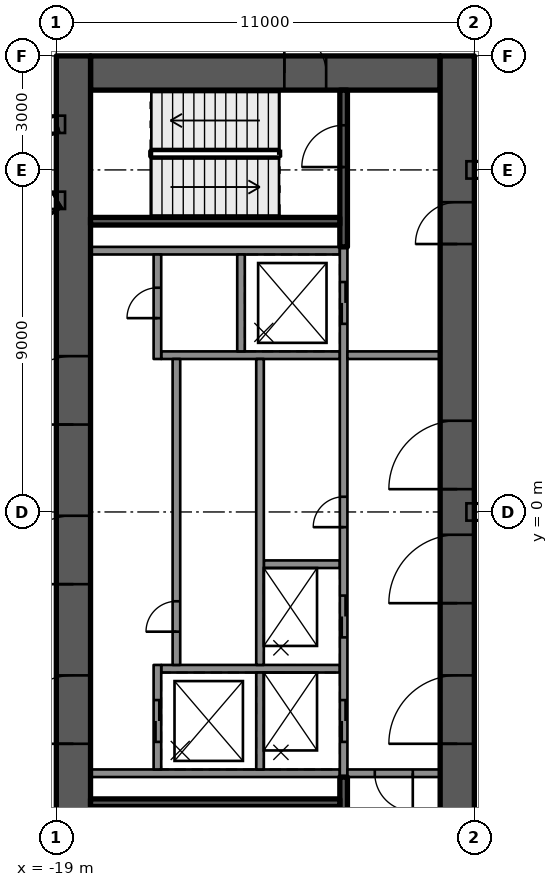
"""IFC4 building model, lengths in metres.
Left out: names, types, materials, properties, quantities, classifications, styles, units other than length and angle.
Written with IfcOpenShell. Run it as: python <this file> out.ifc"""

import sys

from ifc_helpers import new_model, si_unit, direction, frame, frame_2d, origin, place, context, subcontext, project, spatial, rectangle, extrude, element, fill, save


model = new_model("IFC4")
c1 = context("Model", 3, precision=1e-05, world=origin(), true_north=direction((0.0, 1.0)))
c2 = subcontext(c1, "Body", "Model", "MODEL_VIEW")
j1 = project(units=[si_unit("LENGTHUNIT", "METRE"), si_unit("PLANEANGLEUNIT", "RADIAN")], contexts=[c1])
p1 = place(None, origin())
s1 = spatial("IfcSite", under=j1, at=p1, CompositionType="ELEMENT")
p2 = place(p1, origin())
s2 = spatial("IfcBuilding", under=s1, at=p2, CompositionType="ELEMENT")
p3 = place(p2, frame((0.0, 0.0, 271.0)))
s3 = spatial("IfcBuildingStorey", under=s2, at=p3, CompositionType="ELEMENT", Elevation=271.0)
p4 = place(p3, frame((-18.1, 11.55, 0.0), z_axis=(0.0, 0.0, 1.0), x_axis=(1.0, 0.0, 0.0)))
e1 = element("IfcWall", 1, at=p4, inside=s3, PredefinedType="SHEAR", context=c2, shape_type="SweptSolid", body=[
    extrude(rectangle(XDim=9.2, YDim=0.9, at=frame_2d((4.6, 0.0))), origin(), (0.0, 0.0, 1.0), 4.4),
])
p5 = place(p4, frame((5.1, 0.0, 0.0)))
e2 = element("IfcOpeningElement", 2, at=p5, cuts=e1, PredefinedType="OPENING", context=c2, shape_type="SweptSolid", body=[
    extrude(rectangle(XDim=1.1, YDim=2.1, at=frame_2d((0.55, 1.05))), frame((0.0, 0.46, 0.0), z_axis=(0.0, -1.0, 0.0), x_axis=(1.0, 0.0, 0.0)), (0.0, 0.0, 1.0), 0.92),
])
p6 = place(p3, frame((-18.55, -12.0, 0.0), z_axis=(0.0, 0.0, 1.0), x_axis=(0.0, 1.0, 0.0)))
e3 = element("IfcWall", 3, at=p6, inside=s3, PredefinedType="SHEAR", context=c2, shape_type="SweptSolid", body=[
    extrude(rectangle(XDim=24.0, YDim=0.9, at=frame_2d((12.0, 0.0))), origin(), (0.0, 0.0, 1.0), 4.4),
])
p7 = place(p6, frame((5.9, 0.0, 0.0)))
e4 = element("IfcOpeningElement", 4, at=p7, cuts=e3, PredefinedType="OPENING", context=c2, shape_type="SweptSolid", body=[
    extrude(rectangle(XDim=1.8, YDim=2.1, at=frame_2d((0.9, 1.05))), frame((0.0, 0.46, 0.0), z_axis=(0.0, -1.0, 0.0), x_axis=(1.0, 0.0, 0.0)), (0.0, 0.0, 1.0), 0.92),
])
p8 = place(p6, frame((10.1, 0.0, 0.0)))
e5 = element("IfcOpeningElement", 5, at=p8, cuts=e3, PredefinedType="OPENING", context=c2, shape_type="SweptSolid", body=[
    extrude(rectangle(XDim=1.8, YDim=2.1, at=frame_2d((0.9, 1.05))), frame((0.0, 0.46, 0.0), z_axis=(0.0, -1.0, 0.0), x_axis=(1.0, 0.0, 0.0)), (0.0, 0.0, 1.0), 0.92),
])
p9 = place(p6, frame((14.3, 0.0, 0.0)))
e6 = element("IfcOpeningElement", 6, at=p9, cuts=e3, PredefinedType="OPENING", context=c2, shape_type="SweptSolid", body=[
    extrude(rectangle(XDim=1.8, YDim=2.1, at=frame_2d((0.9, 1.05))), frame((0.0, 0.46, 0.0), z_axis=(0.0, -1.0, 0.0), x_axis=(1.0, 0.0, 0.0)), (0.0, 0.0, 1.0), 0.92),
])
p10 = place(p3, frame((-8.45, -12.0, 0.0), z_axis=(0.0, 0.0, 1.0), x_axis=(0.0, 1.0, 0.0)))
e7 = element("IfcWall", 7, at=p10, inside=s3, PredefinedType="SHEAR", context=c2, shape_type="SweptSolid", body=[
    extrude(rectangle(XDim=24.0, YDim=0.9, at=frame_2d((12.0, 0.0))), origin(), (0.0, 0.0, 1.0), 4.4),
])
p11 = place(p10, frame((9.6, 0.0, 0.0)))
e8 = element("IfcOpeningElement", 8, at=p11, cuts=e7, PredefinedType="OPENING", context=c2, shape_type="SweptSolid", body=[
    extrude(rectangle(XDim=1.8, YDim=2.1, at=frame_2d((0.9, 1.05))), frame((0.0, 0.46, 0.0), z_axis=(0.0, -1.0, 0.0), x_axis=(1.0, 0.0, 0.0)), (0.0, 0.0, 1.0), 0.92),
])
p12 = place(p10, frame((5.9, 0.0, 0.0)))
e9 = element("IfcOpeningElement", 9, at=p12, cuts=e7, PredefinedType="OPENING", context=c2, shape_type="SweptSolid", body=[
    extrude(rectangle(XDim=1.8, YDim=2.1, at=frame_2d((0.9, 1.05))), frame((0.0, 0.46, 0.0), z_axis=(0.0, -1.0, 0.0), x_axis=(1.0, 0.0, 0.0)), (0.0, 0.0, 1.0), 0.92),
])
p13 = place(p10, frame((12.6, 0.0, 0.0)))
e10 = element("IfcOpeningElement", 10, at=p13, cuts=e7, PredefinedType="OPENING", context=c2, shape_type="SweptSolid", body=[
    extrude(rectangle(XDim=1.8, YDim=2.1, at=frame_2d((0.9, 1.05))), frame((0.0, 0.46, 0.0), z_axis=(0.0, -1.0, 0.0), x_axis=(1.0, 0.0, 0.0)), (0.0, 0.0, 1.0), 0.92),
])
p14 = place(p10, frame((19.05, 0.0, 0.0)))
e11 = element("IfcOpeningElement", 11, at=p14, cuts=e7, PredefinedType="OPENING", context=c2, shape_type="SweptSolid", body=[
    extrude(rectangle(XDim=1.1, YDim=2.1, at=frame_2d((0.55, 1.05))), frame((0.0, 0.46, 0.0), z_axis=(0.0, -1.0, 0.0), x_axis=(1.0, 0.0, 0.0)), (0.0, 0.0, 1.0), 0.92),
])
for number, where, z_axis, x_axis in (
    (12, (-11.54, 6.875, 0.0), (0.0, 0.0, 1.0), (-1.0, 0.0, 0.0)),
    (13, (-11.54, -6.875, 0.0), (0.0, 0.0, 1.0), (-1.0, 0.0, 0.0)),
):
    element("IfcWall", number, at=place(p3, frame(where, z_axis=z_axis, x_axis=x_axis)), inside=s3, PredefinedType="SOLIDWALL", context=c2, shape_type="SweptSolid", body=[
        extrude(rectangle(XDim=6.56, YDim=0.2, at=frame_2d((3.28, 0.0))), origin(), (0.0, 0.0, 1.0), 3.99),
    ])
p15 = place(p3, frame((-11.54, -4.125, 0.0), z_axis=(0.0, 0.0, 1.0), x_axis=(-1.0, 0.0, 0.0)))
e14 = element("IfcWall", 14, at=p15, inside=s3, PredefinedType="SOLIDWALL", context=c2, shape_type="SweptSolid", body=[
    extrude(rectangle(XDim=4.7, YDim=0.2, at=frame_2d((2.35, 0.0))), origin(), (0.0, 0.0, 1.0), 3.99),
])
p16 = place(p3, frame((-11.54, -1.375, 0.0), z_axis=(0.0, 0.0, 1.0), x_axis=(-1.0, 0.0, 0.0)))
e15 = element("IfcWall", 15, at=p16, inside=s3, PredefinedType="SOLIDWALL", context=c2, shape_type="SweptSolid", body=[
    extrude(rectangle(XDim=2.0, YDim=0.2, at=frame_2d((1.0, 0.0))), origin(), (0.0, 0.0, 1.0), 3.99),
])
p17 = place(p3, frame((-11.54, 4.125, 0.0), z_axis=(0.0, 0.0, 1.0), x_axis=(-1.0, 0.0, 0.0)))
e16 = element("IfcWall", 16, at=p17, inside=s3, PredefinedType="SOLIDWALL", context=c2, shape_type="SweptSolid", body=[
    extrude(rectangle(XDim=4.7, YDim=0.2, at=frame_2d((2.35, 0.0))), origin(), (0.0, 0.0, 1.0), 3.99),
])
p18 = place(p3, frame((-11.44, -6.975, 0.0), z_axis=(0.0, 0.0, 1.0), x_axis=(0.0, 1.0, 0.0)))
e17 = element("IfcWall", 17, at=p18, inside=s3, PredefinedType="SOLIDWALL", context=c2, shape_type="SweptSolid", body=[
    extrude(rectangle(XDim=13.95, YDim=0.2, at=frame_2d((6.975, 0.0))), origin(), (0.0, 0.0, 1.0), 3.99),
])
p19 = place(p18, frame((0.925, 0.0, 0.0)))
e18 = element("IfcOpeningElement", 18, at=p19, cuts=e17, PredefinedType="OPENING", context=c2, shape_type="SweptSolid", body=[
    extrude(rectangle(XDim=1.1, YDim=2.1, at=frame_2d((0.55, 1.05))), frame((0.0, 0.11, 0.0), z_axis=(0.0, -1.0, 0.0), x_axis=(1.0, 0.0, 0.0)), (0.0, 0.0, 1.0), 0.22),
])
p20 = place(p18, frame((3.675, 0.0, 0.0)))
e19 = element("IfcOpeningElement", 19, at=p20, cuts=e17, PredefinedType="OPENING", context=c2, shape_type="SweptSolid", body=[
    extrude(rectangle(XDim=1.1, YDim=2.1, at=frame_2d((0.55, 1.05))), frame((0.0, 0.11, 0.0), z_axis=(0.0, -1.0, 0.0), x_axis=(1.0, 0.0, 0.0)), (0.0, 0.0, 1.0), 0.22),
])
p21 = place(p18, frame((11.925, 0.0, 0.0)))
e20 = element("IfcOpeningElement", 20, at=p21, cuts=e17, PredefinedType="OPENING", context=c2, shape_type="SweptSolid", body=[
    extrude(rectangle(XDim=1.1, YDim=2.1, at=frame_2d((0.55, 1.05))), frame((0.0, 0.11, 0.0), z_axis=(0.0, -1.0, 0.0), x_axis=(1.0, 0.0, 0.0)), (0.0, 0.0, 1.0), 0.22),
])
p22 = place(p18, frame((6.575, 0.0, 0.0)))
e21 = element("IfcOpeningElement", 21, at=p22, cuts=e17, PredefinedType="OPENING", context=c2, shape_type="SweptSolid", body=[
    extrude(rectangle(XDim=0.8, YDim=2.1, at=frame_2d((0.4, 1.05))), frame((0.0, 0.11, 0.0), z_axis=(0.0, -1.0, 0.0), x_axis=(1.0, 0.0, 0.0)), (0.0, 0.0, 1.0), 0.22),
])
p23 = place(p3, frame((-13.64, -6.775, 0.0), z_axis=(0.0, 0.0, 1.0), x_axis=(0.0, 1.0, 0.0)))
e22 = element("IfcWall", 22, at=p23, inside=s3, PredefinedType="SOLIDWALL", context=c2, shape_type="SweptSolid", body=[
    extrude(rectangle(XDim=2.55, YDim=0.2, at=frame_2d((1.275, 0.0))), origin(), (0.0, 0.0, 1.0), 3.99),
])
p24 = place(p3, frame((-13.64, -4.025, 0.0), z_axis=(0.0, 0.0, 1.0), x_axis=(0.0, 1.0, 0.0)))
e23 = element("IfcWall", 23, at=p24, inside=s3, PredefinedType="SOLIDWALL", context=c2, shape_type="SweptSolid", body=[
    extrude(rectangle(XDim=8.05, YDim=0.2, at=frame_2d((4.025, 0.0))), origin(), (0.0, 0.0, 1.0), 3.99),
])
p25 = place(p3, frame((-14.14, 4.225, 0.0), z_axis=(0.0, 0.0, 1.0), x_axis=(0.0, 1.0, 0.0)))
e24 = element("IfcWall", 24, at=p25, inside=s3, PredefinedType="SOLIDWALL", context=c2, shape_type="SweptSolid", body=[
    extrude(rectangle(XDim=2.55, YDim=0.2, at=frame_2d((1.275, 0.0))), origin(), (0.0, 0.0, 1.0), 3.99),
])
p26 = place(p3, frame((-16.34, -6.775, 0.0), z_axis=(0.0, 0.0, 1.0), x_axis=(0.0, 1.0, 0.0)))
e25 = element("IfcWall", 25, at=p26, inside=s3, PredefinedType="SOLIDWALL", context=c2, shape_type="SweptSolid", body=[
    extrude(rectangle(XDim=2.75, YDim=0.2, at=frame_2d((1.375, 0.0))), origin(), (0.0, 0.0, 1.0), 3.99),
])
p27 = place(p26, frame((0.725, 0.0, 0.0)))
e26 = element("IfcOpeningElement", 26, at=p27, cuts=e25, PredefinedType="OPENING", context=c2, shape_type="SweptSolid", body=[
    extrude(rectangle(XDim=1.1, YDim=2.1, at=frame_2d((0.55, 1.05))), frame((0.0, 0.11, 0.0), z_axis=(0.0, -1.0, 0.0), x_axis=(1.0, 0.0, 0.0)), (0.0, 0.0, 1.0), 0.22),
])
p28 = place(p3, frame((-15.84, -4.025, 0.0), z_axis=(0.0, 0.0, 1.0), x_axis=(0.0, 1.0, 0.0)))
e27 = element("IfcWall", 27, at=p28, inside=s3, PredefinedType="SOLIDWALL", context=c2, shape_type="SweptSolid", body=[
    extrude(rectangle(XDim=8.05, YDim=0.2, at=frame_2d((4.025, 0.0))), origin(), (0.0, 0.0, 1.0), 3.99),
])
p29 = place(p28, frame((0.875, 0.0, 0.0)))
e28 = element("IfcOpeningElement", 28, at=p29, cuts=e27, PredefinedType="OPENING", context=c2, shape_type="SweptSolid", body=[
    extrude(rectangle(XDim=0.8, YDim=2.1, at=frame_2d((0.4, 1.05))), frame((0.0, 0.11, 0.0), z_axis=(0.0, -1.0, 0.0), x_axis=(1.0, 0.0, 0.0)), (0.0, 0.0, 1.0), 0.22),
])
p30 = place(p3, frame((-16.34, 4.025, 0.0), z_axis=(0.0, 0.0, 1.0), x_axis=(0.0, 1.0, 0.0)))
e29 = element("IfcWall", 29, at=p30, inside=s3, PredefinedType="SOLIDWALL", context=c2, shape_type="SweptSolid", body=[
    extrude(rectangle(XDim=2.75, YDim=0.2, at=frame_2d((1.375, 0.0))), origin(), (0.0, 0.0, 1.0), 3.99),
])
p31 = place(p30, frame((1.075, 0.0, 0.0)))
e30 = element("IfcOpeningElement", 30, at=p31, cuts=e29, PredefinedType="OPENING", context=c2, shape_type="SweptSolid", body=[
    extrude(rectangle(XDim=0.8, YDim=2.1, at=frame_2d((0.4, 1.05))), frame((0.0, 0.11, 0.0), z_axis=(0.0, -1.0, 0.0), x_axis=(1.0, 0.0, 0.0)), (0.0, 0.0, 1.0), 0.22),
])
p32 = place(p3, frame((-11.44, 6.975, 0.0), z_axis=(0.0, 0.0, 1.0), x_axis=(0.0, 1.0, 0.0)))
e31 = element("IfcWall", 31, at=p32, inside=s3, PredefinedType="SOLIDWALL", context=c2, shape_type="SweptSolid", body=[
    extrude(rectangle(XDim=4.125, YDim=0.2, at=frame_2d((2.062, 0.0))), origin(), (0.0, 0.0, 1.0), 3.99),
])
p33 = place(p32, frame((2.1, 0.0, 0.0)))
e32 = element("IfcOpeningElement", 32, at=p33, cuts=e31, PredefinedType="OPENING", context=c2, shape_type="SweptSolid", body=[
    extrude(rectangle(XDim=1.1, YDim=2.1, at=frame_2d((0.55, 1.05))), frame((0.0, 0.11, 0.0), z_axis=(0.0, -1.0, 0.0), x_axis=(1.0, 0.0, 0.0)), (0.0, 0.0, 1.0), 0.22),
])
p34 = place(p3, frame((-11.54, 7.65, 0.0), z_axis=(0.0, 0.0, 1.0), x_axis=(-1.0, 0.0, 0.0)))
e33 = element("IfcWall", 33, at=p34, inside=s3, PredefinedType="SOLIDWALL", context=c2, shape_type="SweptSolid", body=[
    extrude(rectangle(XDim=6.56, YDim=0.2, at=frame_2d((3.28, 0.0))), origin(), (0.0, 0.0, 1.0), 3.99),
])
p35 = place(p3, frame((-11.44, -11.1, 0.0), z_axis=(0.0, 0.0, 1.0), x_axis=(0.0, 1.0, 0.0)))
e34 = element("IfcWall", 34, at=p35, inside=s3, PredefinedType="SOLIDWALL", context=c2, shape_type="SweptSolid", body=[
    extrude(rectangle(XDim=4.125, YDim=0.2, at=frame_2d((2.062, 0.0))), origin(), (0.0, 0.0, 1.0), 3.99),
])
p36 = place(p3, frame((-11.54, -7.65, 0.0), z_axis=(0.0, 0.0, 1.0), x_axis=(-1.0, 0.0, 0.0)))
e35 = element("IfcWall", 35, at=p36, inside=s3, PredefinedType="SOLIDWALL", context=c2, shape_type="SweptSolid", body=[
    extrude(rectangle(XDim=6.56, YDim=0.2, at=frame_2d((3.28, 0.0))), origin(), (0.0, 0.0, 1.0), 3.99),
])
p37 = place(p3, frame((-8.9, 4.125, 0.0), z_axis=(0.0, 0.0, 1.0), x_axis=(-1.0, 0.0, 0.0)))
e36 = element("IfcWall", 36, at=p37, inside=s3, PredefinedType="PARTITIONING", context=c2, shape_type="SweptSolid", body=[
    extrude(rectangle(XDim=2.44, YDim=0.2, at=frame_2d((1.22, 0.0))), origin(), (0.0, 0.0, 1.0), 3.99),
])
p38 = place(p3, frame((-8.9, -6.875, 0.0), z_axis=(0.0, 0.0, 1.0), x_axis=(-1.0, 0.0, 0.0)))
e37 = element("IfcWall", 37, at=p38, inside=s3, PredefinedType="PARTITIONING", context=c2, shape_type="SweptSolid", body=[
    extrude(rectangle(XDim=2.44, YDim=0.2, at=frame_2d((1.22, 0.0))), origin(), (0.0, 0.0, 1.0), 3.99),
])
p39 = place(p38, frame((0.72, 0.0, 0.0)))
e38 = element("IfcOpeningElement", 38, at=p39, cuts=e37, PredefinedType="OPENING", context=c2, shape_type="SweptSolid", body=[
    extrude(rectangle(XDim=1.0, YDim=2.1, at=frame_2d((0.5, 1.05))), frame((0.0, 0.11, 0.0), z_axis=(0.0, -1.0, 0.0), x_axis=(1.0, 0.0, 0.0)), (0.0, 0.0, 1.0), 0.22),
])
p40 = place(p19, origin())
e39 = element("IfcDoor", 39, at=p40, inside=s3, OperationType="DOUBLE_DOOR_SLIDING", PredefinedType="DOOR", context=c2, shape_type="SweptSolid", body=[
    extrude(rectangle(XDim=1.1, YDim=2.1, at=frame_2d((0.55, 1.05))), frame((0.0, 0.025, 0.0), z_axis=(0.0, -1.0, 0.0), x_axis=(1.0, 0.0, 0.0)), (0.0, 0.0, 1.0), 0.05),
])
fill(e18, e39)
p41 = place(p27, origin())
e40 = element("IfcDoor", 40, at=p41, inside=s3, OperationType="DOUBLE_DOOR_SLIDING", PredefinedType="DOOR", context=c2, shape_type="SweptSolid", body=[
    extrude(rectangle(XDim=1.1, YDim=2.1, at=frame_2d((0.55, 1.05))), frame((0.0, 0.025, 0.0), z_axis=(0.0, -1.0, 0.0), x_axis=(1.0, 0.0, 0.0)), (0.0, 0.0, 1.0), 0.05),
])
fill(e26, e40)
p42 = place(p20, origin())
e41 = element("IfcDoor", 41, at=p42, inside=s3, OperationType="DOUBLE_DOOR_SLIDING", PredefinedType="DOOR", context=c2, shape_type="SweptSolid", body=[
    extrude(rectangle(XDim=1.1, YDim=2.1, at=frame_2d((0.55, 1.05))), frame((0.0, 0.025, 0.0), z_axis=(0.0, -1.0, 0.0), x_axis=(1.0, 0.0, 0.0)), (0.0, 0.0, 1.0), 0.05),
])
fill(e19, e41)
p43 = place(p21, origin())
e42 = element("IfcDoor", 42, at=p43, inside=s3, OperationType="DOUBLE_DOOR_SLIDING", PredefinedType="DOOR", context=c2, shape_type="SweptSolid", body=[
    extrude(rectangle(XDim=1.1, YDim=2.1, at=frame_2d((0.55, 1.05))), frame((0.0, 0.025, 0.0), z_axis=(0.0, -1.0, 0.0), x_axis=(1.0, 0.0, 0.0)), (0.0, 0.0, 1.0), 0.05),
])
fill(e20, e42)
p44 = place(p29, origin())
e43 = element("IfcDoor", 43, at=p44, inside=s3, OperationType="SINGLE_SWING_LEFT", PredefinedType="DOOR", context=c2, shape_type="SweptSolid", body=[
    extrude(rectangle(XDim=0.8, YDim=2.1, at=frame_2d((0.4, 1.05))), frame((0.0, 0.025, 0.0), z_axis=(0.0, -1.0, 0.0), x_axis=(1.0, 0.0, 0.0)), (0.0, 0.0, 1.0), 0.05),
])
fill(e28, e43)
p45 = place(p22, origin())
e44 = element("IfcDoor", 44, at=p45, inside=s3, OperationType="SINGLE_SWING_LEFT", PredefinedType="DOOR", context=c2, shape_type="SweptSolid", body=[
    extrude(rectangle(XDim=0.8, YDim=2.1, at=frame_2d((0.4, 1.05))), frame((0.0, 0.025, 0.0), z_axis=(0.0, -1.0, 0.0), x_axis=(1.0, 0.0, 0.0)), (0.0, 0.0, 1.0), 0.05),
])
fill(e21, e44)
p46 = place(p31, origin())
e45 = element("IfcDoor", 45, at=p46, inside=s3, OperationType="SINGLE_SWING_LEFT", PredefinedType="DOOR", context=c2, shape_type="SweptSolid", body=[
    extrude(rectangle(XDim=0.8, YDim=2.1, at=frame_2d((0.4, 1.05))), frame((0.0, 0.025, 0.0), z_axis=(0.0, -1.0, 0.0), x_axis=(1.0, 0.0, 0.0)), (0.0, 0.0, 1.0), 0.05),
])
fill(e30, e45)
p47 = place(p11, origin())
e46 = element("IfcDoor", 46, at=p47, inside=s3, OperationType="SINGLE_SWING_LEFT", PredefinedType="DOOR", context=c2, shape_type="SweptSolid", body=[
    extrude(rectangle(XDim=1.8, YDim=2.1, at=frame_2d((0.9, 1.05))), frame((0.0, 0.025, 0.0), z_axis=(0.0, -1.0, 0.0), x_axis=(1.0, 0.0, 0.0)), (0.0, 0.0, 1.0), 0.05),
])
fill(e8, e46)
p48 = place(p7, origin())
e47 = element("IfcDoor", 47, at=p48, inside=s3, OperationType="SINGLE_SWING_LEFT", PredefinedType="DOOR", context=c2, shape_type="SweptSolid", body=[
    extrude(rectangle(XDim=1.8, YDim=2.1, at=frame_2d((0.9, 1.05))), frame((0.0, 0.025, 0.0), z_axis=(0.0, -1.0, 0.0), x_axis=(1.0, 0.0, 0.0)), (0.0, 0.0, 1.0), 0.05),
])
fill(e4, e47)
p49 = place(p8, origin())
e48 = element("IfcDoor", 48, at=p49, inside=s3, OperationType="SINGLE_SWING_LEFT", PredefinedType="DOOR", context=c2, shape_type="SweptSolid", body=[
    extrude(rectangle(XDim=1.8, YDim=2.1, at=frame_2d((0.9, 1.05))), frame((0.0, 0.025, 0.0), z_axis=(0.0, -1.0, 0.0), x_axis=(1.0, 0.0, 0.0)), (0.0, 0.0, 1.0), 0.05),
])
fill(e5, e48)
p50 = place(p9, origin())
e49 = element("IfcDoor", 49, at=p50, inside=s3, OperationType="SINGLE_SWING_RIGHT", PredefinedType="DOOR", context=c2, shape_type="SweptSolid", body=[
    extrude(rectangle(XDim=1.8, YDim=2.1, at=frame_2d((0.9, 1.05))), frame((0.0, 0.025, 0.0), z_axis=(0.0, -1.0, 0.0), x_axis=(1.0, 0.0, 0.0)), (0.0, 0.0, 1.0), 0.05),
])
fill(e6, e49)
p51 = place(p12, origin())
e50 = element("IfcDoor", 50, at=p51, inside=s3, OperationType="SINGLE_SWING_LEFT", PredefinedType="DOOR", context=c2, shape_type="SweptSolid", body=[
    extrude(rectangle(XDim=1.8, YDim=2.1, at=frame_2d((0.9, 1.05))), frame((0.0, 0.025, 0.0), z_axis=(0.0, -1.0, 0.0), x_axis=(1.0, 0.0, 0.0)), (0.0, 0.0, 1.0), 0.05),
])
fill(e9, e50)
p52 = place(p13, origin())
e51 = element("IfcDoor", 51, at=p52, inside=s3, OperationType="SINGLE_SWING_RIGHT", PredefinedType="DOOR", context=c2, shape_type="SweptSolid", body=[
    extrude(rectangle(XDim=1.8, YDim=2.1, at=frame_2d((0.9, 1.05))), frame((0.0, 0.025, 0.0), z_axis=(0.0, -1.0, 0.0), x_axis=(1.0, 0.0, 0.0)), (0.0, 0.0, 1.0), 0.05),
])
fill(e10, e51)
p53 = place(p14, origin())
e52 = element("IfcDoor", 52, at=p53, inside=s3, OperationType="SINGLE_SWING_RIGHT", PredefinedType="DOOR", context=c2, shape_type="SweptSolid", body=[
    extrude(rectangle(XDim=1.1, YDim=2.1, at=frame_2d((0.55, 1.05))), frame((0.0, 0.025, 0.0), z_axis=(0.0, -1.0, 0.0), x_axis=(1.0, 0.0, 0.0)), (0.0, 0.0, 1.0), 0.05),
])
fill(e11, e52)
p54 = place(p5, origin())
e53 = element("IfcDoor", 53, at=p54, inside=s3, OperationType="SINGLE_SWING_RIGHT", PredefinedType="DOOR", context=c2, shape_type="SweptSolid", body=[
    extrude(rectangle(XDim=1.1, YDim=2.1, at=frame_2d((0.55, 1.05))), frame((0.0, 0.025, 0.0), z_axis=(0.0, -1.0, 0.0), x_axis=(1.0, 0.0, 0.0)), (0.0, 0.0, 1.0), 0.05),
])
fill(e2, e53)
p55 = place(p33, origin())
e54 = element("IfcDoor", 54, at=p55, inside=s3, OperationType="SINGLE_SWING_RIGHT", PredefinedType="DOOR", context=c2, shape_type="SweptSolid", body=[
    extrude(rectangle(XDim=1.1, YDim=2.1, at=frame_2d((0.55, 1.05))), frame((0.0, 0.025, 0.0), z_axis=(0.0, -1.0, 0.0), x_axis=(1.0, 0.0, 0.0)), (0.0, 0.0, 1.0), 0.05),
])
fill(e32, e54)
p56 = place(p39, origin())
e55 = element("IfcDoor", 55, at=p56, inside=s3, OperationType="SINGLE_SWING_RIGHT", PredefinedType="DOOR", context=c2, shape_type="SweptSolid", body=[
    extrude(rectangle(XDim=1.0, YDim=2.1, at=frame_2d((0.5, 1.05))), frame((0.0, 0.025, 0.0), z_axis=(0.0, -1.0, 0.0), x_axis=(1.0, 0.0, 0.0)), (0.0, 0.0, 1.0), 0.05),
])
fill(e38, e55)
save(model, sys.argv[1])
